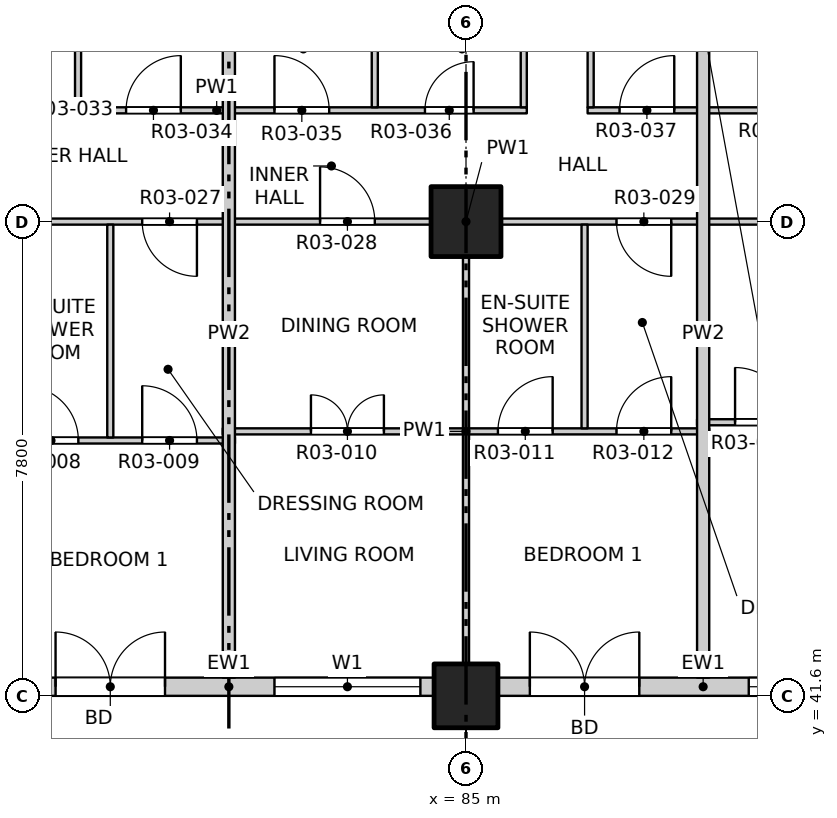
"""IFC4 building model, lengths in metres.
Left out: names, types, materials, properties, quantities, classifications, styles, units other than length and angle.
Written with IfcOpenShell. Run it as: python <this file> out.ifc"""

import sys

from ifc_helpers import new_model, si_unit, direction, frame, frame_2d, origin, origin_2d, place, context, subcontext, project, spatial, rectangle, extrude, element, fill, save


model = new_model("IFC4")
c1 = context("Model", 3, precision=1e-05, world=origin(), true_north=direction((0.0, 1.0)))
c2 = subcontext(c1, "Body", "Model", "MODEL_VIEW")
j1 = project(units=[si_unit("LENGTHUNIT", "METRE"), si_unit("PLANEANGLEUNIT", "RADIAN")], contexts=[c1])
p1 = place(None, origin())
s1 = spatial("IfcSite", under=j1, at=p1, CompositionType="ELEMENT")
p2 = place(p1, origin())
s2 = spatial("IfcBuilding", under=s1, at=p2, CompositionType="ELEMENT")
p3 = place(p2, frame((0.0, 0.0, 39.9)))
s3 = spatial("IfcBuildingStorey", under=s2, at=p3, CompositionType="ELEMENT", Elevation=39.9)
p4 = place(p3, frame((85.0, 41.6, -0.25), z_axis=(0.0, 0.0, 1.0), x_axis=(1.0, 0.0, 0.0)))
e1 = element("IfcColumn", 1, at=p4, inside=s3, PredefinedType="COLUMN", context=c2, shape_type="SweptSolid", body=[
    extrude(rectangle(XDim=1.05, YDim=1.05, at=origin_2d()), origin(), (0.0, 0.0, 1.0), 3.4),
])
p5 = place(p3, frame((85.0, 49.4, -0.25), z_axis=(0.0, 0.0, 1.0), x_axis=(1.0, 0.0, 0.0)))
e2 = element("IfcColumn", 2, at=p5, inside=s3, PredefinedType="COLUMN", context=c2, shape_type="SweptSolid", body=[
    extrude(rectangle(XDim=1.15, YDim=1.15, at=origin_2d()), origin(), (0.0, 0.0, 1.0), 3.4),
])
p6 = place(p3, frame((77.725, 41.75, 0.0), z_axis=(0.0, 0.0, 1.0), x_axis=(1.0, 0.0, 0.0)))
e3 = element("IfcWall", 3, at=p6, inside=s3, PredefinedType="SOLIDWALL", context=c2, shape_type="SweptSolid", body=[
    extrude(rectangle(XDim=6.75, YDim=0.3, at=frame_2d((3.375, 0.0))), origin(), (0.0, 0.0, 1.0), 2.7),
])
p7 = place(p6, frame((0.525, 0.0, 0.0)))
e4 = element("IfcOpeningElement", 4, at=p7, cuts=e3, PredefinedType="OPENING", context=c2, shape_type="SweptSolid", body=[
    extrude(rectangle(XDim=1.8, YDim=2.4, at=frame_2d((0.9, 1.2))), frame((0.0, 0.16, 0.0), z_axis=(0.0, -1.0, 0.0), x_axis=(1.0, 0.0, 0.0)), (0.0, 0.0, 1.0), 0.32),
])
p8 = place(p6, frame((4.125, 0.0, 0.9)))
e5 = element("IfcOpeningElement", 5, at=p8, cuts=e3, PredefinedType="OPENING", context=c2, shape_type="SweptSolid", body=[
    extrude(rectangle(XDim=2.4, YDim=1.8, at=frame_2d((1.2, 0.9))), frame((0.0, 0.16, 0.0), z_axis=(0.0, -1.0, 0.0), x_axis=(1.0, 0.0, 0.0)), (0.0, 0.0, 1.0), 0.32),
])
p9 = place(p3, frame((85.525, 41.75, 0.0), z_axis=(0.0, 0.0, 1.0), x_axis=(1.0, 0.0, 0.0)))
e6 = element("IfcWall", 6, at=p9, inside=s3, PredefinedType="SOLIDWALL", context=c2, shape_type="SweptSolid", body=[
    extrude(rectangle(XDim=6.75, YDim=0.3, at=frame_2d((3.375, 0.0))), origin(), (0.0, 0.0, 1.0), 2.7),
])
p10 = place(p9, frame((0.525, 0.0, 0.0)))
e7 = element("IfcOpeningElement", 7, at=p10, cuts=e6, PredefinedType="OPENING", context=c2, shape_type="SweptSolid", body=[
    extrude(rectangle(XDim=1.8, YDim=2.4, at=frame_2d((0.9, 1.2))), frame((0.0, 0.16, 0.0), z_axis=(0.0, -1.0, 0.0), x_axis=(1.0, 0.0, 0.0)), (0.0, 0.0, 1.0), 0.32),
])
p11 = place(p9, frame((4.125, 0.0, 0.9)))
e8 = element("IfcOpeningElement", 8, at=p11, cuts=e6, PredefinedType="OPENING", context=c2, shape_type="SweptSolid", body=[
    extrude(rectangle(XDim=2.4, YDim=1.8, at=frame_2d((1.2, 0.9))), frame((0.0, 0.16, 0.0), z_axis=(0.0, -1.0, 0.0), x_axis=(1.0, 0.0, 0.0)), (0.0, 0.0, 1.0), 0.32),
])
p12 = place(p3, frame((73.2, 45.8, 0.0), z_axis=(0.0, 0.0, 1.0), x_axis=(1.0, 0.0, 0.0)))
e9 = element("IfcWall", 9, at=p12, inside=s3, PredefinedType="PARTITIONING", context=c2, shape_type="SweptSolid", body=[
    extrude(rectangle(XDim=8.0, YDim=0.1, at=frame_2d((4.0, 0.0))), origin(), (0.0, 0.0, 1.0), 3.15),
])
p13 = place(p12, frame((1.45, 0.0, 0.0)))
e10 = element("IfcOpeningElement", 10, at=p13, cuts=e9, PredefinedType="OPENING", context=c2, shape_type="SweptSolid", body=[
    extrude(rectangle(XDim=1.2, YDim=2.1, at=frame_2d((0.6, 1.05))), frame((0.0, 0.06, 0.0), z_axis=(0.0, -1.0, 0.0), x_axis=(1.0, 0.0, 0.0)), (0.0, 0.0, 1.0), 0.12),
])
p14 = place(p12, frame((4.525, 0.0, 0.0)))
e11 = element("IfcOpeningElement", 11, at=p14, cuts=e9, PredefinedType="OPENING", context=c2, shape_type="SweptSolid", body=[
    extrude(rectangle(XDim=0.9, YDim=2.1, at=frame_2d((0.45, 1.05))), frame((0.0, 0.06, 0.0), z_axis=(0.0, -1.0, 0.0), x_axis=(1.0, 0.0, 0.0)), (0.0, 0.0, 1.0), 0.12),
])
p15 = place(p12, frame((6.475, 0.0, 0.0)))
e12 = element("IfcOpeningElement", 12, at=p15, cuts=e9, PredefinedType="OPENING", context=c2, shape_type="SweptSolid", body=[
    extrude(rectangle(XDim=0.9, YDim=2.1, at=frame_2d((0.45, 1.05))), frame((0.0, 0.06, 0.0), z_axis=(0.0, -1.0, 0.0), x_axis=(1.0, 0.0, 0.0)), (0.0, 0.0, 1.0), 0.12),
])
p16 = place(p3, frame((81.0, 45.95, 0.0), z_axis=(0.0, 0.0, 1.0), x_axis=(1.0, 0.0, 0.0)))
e13 = element("IfcWall", 13, at=p16, inside=s3, PredefinedType="PARTITIONING", context=c2, shape_type="SweptSolid", body=[
    extrude(rectangle(XDim=8.0, YDim=0.1, at=frame_2d((4.0, 0.0))), origin(), (0.0, 0.0, 1.0), 3.15),
])
p17 = place(p16, frame((1.45, 0.0, 0.0)))
e14 = element("IfcOpeningElement", 14, at=p17, cuts=e13, PredefinedType="OPENING", context=c2, shape_type="SweptSolid", body=[
    extrude(rectangle(XDim=1.2, YDim=2.1, at=frame_2d((0.6, 1.05))), frame((0.0, 0.06, 0.0), z_axis=(0.0, -1.0, 0.0), x_axis=(1.0, 0.0, 0.0)), (0.0, 0.0, 1.0), 0.12),
])
p18 = place(p16, frame((4.525, 0.0, 0.0)))
e15 = element("IfcOpeningElement", 15, at=p18, cuts=e13, PredefinedType="OPENING", context=c2, shape_type="SweptSolid", body=[
    extrude(rectangle(XDim=0.9, YDim=2.1, at=frame_2d((0.45, 1.05))), frame((0.0, 0.06, 0.0), z_axis=(0.0, -1.0, 0.0), x_axis=(1.0, 0.0, 0.0)), (0.0, 0.0, 1.0), 0.12),
])
p19 = place(p16, frame((6.475, 0.0, 0.0)))
e16 = element("IfcOpeningElement", 16, at=p19, cuts=e13, PredefinedType="OPENING", context=c2, shape_type="SweptSolid", body=[
    extrude(rectangle(XDim=0.9, YDim=2.1, at=frame_2d((0.45, 1.05))), frame((0.0, 0.06, 0.0), z_axis=(0.0, -1.0, 0.0), x_axis=(1.0, 0.0, 0.0)), (0.0, 0.0, 1.0), 0.12),
])
p20 = place(p3, frame((88.8, 46.1, 0.0), z_axis=(0.0, 0.0, 1.0), x_axis=(1.0, 0.0, 0.0)))
e17 = element("IfcWall", 17, at=p20, inside=s3, PredefinedType="PARTITIONING", context=c2, shape_type="SweptSolid", body=[
    extrude(rectangle(XDim=8.0, YDim=0.1, at=frame_2d((4.0, 0.0))), origin(), (0.0, 0.0, 1.0), 3.15),
])
p21 = place(p20, frame((0.625, 0.0, 0.0)))
e18 = element("IfcOpeningElement", 18, at=p21, cuts=e17, PredefinedType="OPENING", context=c2, shape_type="SweptSolid", body=[
    extrude(rectangle(XDim=0.9, YDim=2.1, at=frame_2d((0.45, 1.05))), frame((0.0, 0.06, 0.0), z_axis=(0.0, -1.0, 0.0), x_axis=(1.0, 0.0, 0.0)), (0.0, 0.0, 1.0), 0.12),
])
p22 = place(p20, frame((2.575, 0.0, 0.0)))
e19 = element("IfcOpeningElement", 19, at=p22, cuts=e17, PredefinedType="OPENING", context=c2, shape_type="SweptSolid", body=[
    extrude(rectangle(XDim=0.9, YDim=2.1, at=frame_2d((0.45, 1.05))), frame((0.0, 0.06, 0.0), z_axis=(0.0, -1.0, 0.0), x_axis=(1.0, 0.0, 0.0)), (0.0, 0.0, 1.0), 0.12),
])
p23 = place(p20, frame((5.35, 0.0, 0.0)))
e20 = element("IfcOpeningElement", 20, at=p23, cuts=e17, PredefinedType="OPENING", context=c2, shape_type="SweptSolid", body=[
    extrude(rectangle(XDim=1.2, YDim=2.1, at=frame_2d((0.6, 1.05))), frame((0.0, 0.06, 0.0), z_axis=(0.0, -1.0, 0.0), x_axis=(1.0, 0.0, 0.0)), (0.0, 0.0, 1.0), 0.12),
])
p24 = place(p3, frame((73.2, 49.4, 0.0), z_axis=(0.0, 0.0, 1.0), x_axis=(1.0, 0.0, 0.0)))
e21 = element("IfcWall", 21, at=p24, inside=s3, PredefinedType="PARTITIONING", context=c2, shape_type="SweptSolid", body=[
    extrude(rectangle(XDim=23.6, YDim=0.1, at=frame_2d((11.8, 0.0))), origin(), (0.0, 0.0, 1.0), 3.15),
])
p25 = place(p24, frame((1.6, 0.0, 0.0)))
e22 = element("IfcOpeningElement", 22, at=p25, cuts=e21, PredefinedType="OPENING", context=c2, shape_type="SweptSolid", body=[
    extrude(rectangle(XDim=0.9, YDim=2.1, at=frame_2d((0.45, 1.05))), frame((0.0, 0.06, 0.0), z_axis=(0.0, -1.0, 0.0), x_axis=(1.0, 0.0, 0.0)), (0.0, 0.0, 1.0), 0.12),
])
p26 = place(p24, frame((6.475, 0.0, 0.0)))
e23 = element("IfcOpeningElement", 23, at=p26, cuts=e21, PredefinedType="OPENING", context=c2, shape_type="SweptSolid", body=[
    extrude(rectangle(XDim=0.9, YDim=2.1, at=frame_2d((0.45, 1.05))), frame((0.0, 0.06, 0.0), z_axis=(0.0, -1.0, 0.0), x_axis=(1.0, 0.0, 0.0)), (0.0, 0.0, 1.0), 0.12),
])
p27 = place(p24, frame((9.4, 0.0, 0.0)))
e24 = element("IfcOpeningElement", 24, at=p27, cuts=e21, PredefinedType="OPENING", context=c2, shape_type="SweptSolid", body=[
    extrude(rectangle(XDim=0.9, YDim=2.1, at=frame_2d((0.45, 1.05))), frame((0.0, 0.06, 0.0), z_axis=(0.0, -1.0, 0.0), x_axis=(1.0, 0.0, 0.0)), (0.0, 0.0, 1.0), 0.12),
])
p28 = place(p24, frame((14.275, 0.0, 0.0)))
e25 = element("IfcOpeningElement", 25, at=p28, cuts=e21, PredefinedType="OPENING", context=c2, shape_type="SweptSolid", body=[
    extrude(rectangle(XDim=0.9, YDim=2.1, at=frame_2d((0.45, 1.05))), frame((0.0, 0.06, 0.0), z_axis=(0.0, -1.0, 0.0), x_axis=(1.0, 0.0, 0.0)), (0.0, 0.0, 1.0), 0.12),
])
p29 = place(p24, frame((18.0, 0.0, 0.0)))
e26 = element("IfcOpeningElement", 26, at=p29, cuts=e21, PredefinedType="OPENING", context=c2, shape_type="SweptSolid", body=[
    extrude(rectangle(XDim=0.9, YDim=2.1, at=frame_2d((0.45, 1.05))), frame((0.0, 0.06, 0.0), z_axis=(0.0, -1.0, 0.0), x_axis=(1.0, 0.0, 0.0)), (0.0, 0.0, 1.0), 0.12),
])
p30 = place(p24, frame((21.1, 0.0, 0.0)))
e27 = element("IfcOpeningElement", 27, at=p30, cuts=e21, PredefinedType="OPENING", context=c2, shape_type="SweptSolid", body=[
    extrude(rectangle(XDim=0.9, YDim=2.1, at=frame_2d((0.45, 1.05))), frame((0.0, 0.06, 0.0), z_axis=(0.0, -1.0, 0.0), x_axis=(1.0, 0.0, 0.0)), (0.0, 0.0, 1.0), 0.12),
])
p31 = place(p3, frame((75.8, 51.23, 0.0), z_axis=(0.0, 0.0, 1.0), x_axis=(1.0, 0.0, 0.0)))
e28 = element("IfcWall", 28, at=p31, inside=s3, PredefinedType="PARTITIONING", context=c2, shape_type="SweptSolid", body=[
    extrude(rectangle(XDim=10.2, YDim=0.1, at=frame_2d((5.1, 0.0))), origin(), (0.0, 0.0, 1.0), 3.15),
])
p32 = place(p31, frame((0.985, 0.0, 0.0)))
e29 = element("IfcOpeningElement", 29, at=p32, cuts=e28, PredefinedType="OPENING", context=c2, shape_type="SweptSolid", body=[
    extrude(rectangle(XDim=0.9, YDim=2.1, at=frame_2d((0.45, 1.05))), frame((0.0, 0.06, 0.0), z_axis=(0.0, -1.0, 0.0), x_axis=(1.0, 0.0, 0.0)), (0.0, 0.0, 1.0), 0.12),
])
p33 = place(p31, frame((3.61, 0.0, 0.0)))
e30 = element("IfcOpeningElement", 30, at=p33, cuts=e28, PredefinedType="OPENING", context=c2, shape_type="SweptSolid", body=[
    extrude(rectangle(XDim=0.9, YDim=2.1, at=frame_2d((0.45, 1.05))), frame((0.0, 0.06, 0.0), z_axis=(0.0, -1.0, 0.0), x_axis=(1.0, 0.0, 0.0)), (0.0, 0.0, 1.0), 0.12),
])
p34 = place(p31, frame((6.05, 0.0, 0.0)))
e31 = element("IfcOpeningElement", 31, at=p34, cuts=e28, PredefinedType="OPENING", context=c2, shape_type="SweptSolid", body=[
    extrude(rectangle(XDim=0.9, YDim=2.1, at=frame_2d((0.45, 1.05))), frame((0.0, 0.06, 0.0), z_axis=(0.0, -1.0, 0.0), x_axis=(1.0, 0.0, 0.0)), (0.0, 0.0, 1.0), 0.12),
])
p35 = place(p31, frame((8.525, 0.0, 0.0)))
e32 = element("IfcOpeningElement", 32, at=p35, cuts=e28, PredefinedType="OPENING", context=c2, shape_type="SweptSolid", body=[
    extrude(rectangle(XDim=0.8, YDim=2.1, at=frame_2d((0.4, 1.05))), frame((0.0, 0.06, 0.0), z_axis=(0.0, -1.0, 0.0), x_axis=(1.0, 0.0, 0.0)), (0.0, 0.0, 1.0), 0.12),
])
p36 = place(p3, frame((87.0, 51.23, 0.0), z_axis=(0.0, 0.0, 1.0), x_axis=(1.0, 0.0, 0.0)))
e33 = element("IfcWall", 33, at=p36, inside=s3, PredefinedType="PARTITIONING", context=c2, shape_type="SweptSolid", body=[
    extrude(rectangle(XDim=6.95, YDim=0.1, at=frame_2d((3.475, 0.0))), origin(), (0.0, 0.0, 1.0), 3.15),
])
p37 = place(p36, frame((0.525, 0.0, 0.0)))
e34 = element("IfcOpeningElement", 34, at=p37, cuts=e33, PredefinedType="OPENING", context=c2, shape_type="SweptSolid", body=[
    extrude(rectangle(XDim=0.9, YDim=2.1, at=frame_2d((0.45, 1.05))), frame((0.0, 0.06, 0.0), z_axis=(0.0, -1.0, 0.0), x_axis=(1.0, 0.0, 0.0)), (0.0, 0.0, 1.0), 0.12),
])
p38 = place(p36, frame((2.875, 0.0, 0.0)))
e35 = element("IfcOpeningElement", 35, at=p38, cuts=e33, PredefinedType="OPENING", context=c2, shape_type="SweptSolid", body=[
    extrude(rectangle(XDim=0.9, YDim=2.1, at=frame_2d((0.45, 1.05))), frame((0.0, 0.06, 0.0), z_axis=(0.0, -1.0, 0.0), x_axis=(1.0, 0.0, 0.0)), (0.0, 0.0, 1.0), 0.12),
])
p39 = place(p36, frame((5.425, 0.0, 0.0)))
e36 = element("IfcOpeningElement", 36, at=p39, cuts=e33, PredefinedType="OPENING", context=c2, shape_type="SweptSolid", body=[
    extrude(rectangle(XDim=0.8, YDim=2.1, at=frame_2d((0.4, 1.05))), frame((0.0, 0.06, 0.0), z_axis=(0.0, -1.0, 0.0), x_axis=(1.0, 0.0, 0.0)), (0.0, 0.0, 1.0), 0.12),
])
p40 = place(p3, frame((78.62, 51.28, 0.0), z_axis=(0.0, 0.0, 1.0), x_axis=(0.0, 1.0, 0.0)))
e37 = element("IfcWall", 37, at=p40, inside=s3, PredefinedType="PARTITIONING", context=c2, shape_type="SweptSolid", body=[
    extrude(rectangle(XDim=1.92, YDim=0.1, at=frame_2d((0.96, 0.0))), origin(), (0.0, 0.0, 1.0), 3.15),
])
p41 = place(p3, frame((79.15, 45.85, 0.0), z_axis=(0.0, 0.0, 1.0), x_axis=(0.0, 1.0, 0.0)))
e38 = element("IfcWall", 38, at=p41, inside=s3, PredefinedType="PARTITIONING", context=c2, shape_type="SweptSolid", body=[
    extrude(rectangle(XDim=3.5, YDim=0.1, at=frame_2d((1.75, 0.0))), origin(), (0.0, 0.0, 1.0), 3.15),
])
p42 = place(p3, frame((81.1, 41.9, 0.0), z_axis=(0.0, 0.0, 1.0), x_axis=(0.0, 1.0, 0.0)))
e39 = element("IfcWall", 39, at=p42, inside=s3, PredefinedType="PARTITIONING", context=c2, shape_type="SweptSolid", body=[
    extrude(rectangle(XDim=11.3, YDim=0.2, at=frame_2d((5.65, 0.0))), origin(), (0.0, 0.0, 1.0), 3.15),
])
p43 = place(p3, frame((83.5, 51.28, 0.0), z_axis=(0.0, 0.0, 1.0), x_axis=(0.0, 1.0, 0.0)))
e40 = element("IfcWall", 40, at=p43, inside=s3, PredefinedType="PARTITIONING", context=c2, shape_type="SweptSolid", body=[
    extrude(rectangle(XDim=1.92, YDim=0.1, at=frame_2d((0.96, 0.0))), origin(), (0.0, 0.0, 1.0), 3.15),
])
p44 = place(p3, frame((85.0, 41.9, 0.0), z_axis=(0.0, 0.0, 1.0), x_axis=(0.0, 1.0, 0.0)))
e41 = element("IfcWall", 41, at=p44, inside=s3, PredefinedType="PARTITIONING", context=c2, shape_type="SweptSolid", body=[
    extrude(rectangle(XDim=7.45, YDim=0.1, at=frame_2d((3.725, 0.0))), origin(), (0.0, 0.0, 1.0), 2.55),
])
p45 = place(p3, frame((85.95, 51.28, 0.0), z_axis=(0.0, 0.0, 1.0), x_axis=(0.0, 1.0, 0.0)))
e42 = element("IfcWall", 42, at=p45, inside=s3, PredefinedType="PARTITIONING", context=c2, shape_type="SweptSolid", body=[
    extrude(rectangle(XDim=1.92, YDim=0.1, at=frame_2d((0.96, 0.0))), origin(), (0.0, 0.0, 1.0), 3.15),
])
p46 = place(p3, frame((86.95, 46.0, 0.0), z_axis=(0.0, 0.0, 1.0), x_axis=(0.0, 1.0, 0.0)))
e43 = element("IfcWall", 43, at=p46, inside=s3, PredefinedType="PARTITIONING", context=c2, shape_type="SweptSolid", body=[
    extrude(rectangle(XDim=3.35, YDim=0.1, at=frame_2d((1.675, 0.0))), origin(), (0.0, 0.0, 1.0), 3.15),
])
p47 = place(p3, frame((87.05, 51.28, 0.0), z_axis=(0.0, 0.0, 1.0), x_axis=(0.0, 1.0, 0.0)))
e44 = element("IfcWall", 44, at=p47, inside=s3, PredefinedType="PARTITIONING", context=c2, shape_type="SweptSolid", body=[
    extrude(rectangle(XDim=1.92, YDim=0.1, at=frame_2d((0.96, 0.0))), origin(), (0.0, 0.0, 1.0), 3.15),
])
p48 = place(p3, frame((88.9, 41.9, 0.0), z_axis=(0.0, 0.0, 1.0), x_axis=(0.0, 1.0, 0.0)))
e45 = element("IfcWall", 45, at=p48, inside=s3, PredefinedType="PARTITIONING", context=c2, shape_type="SweptSolid", body=[
    extrude(rectangle(XDim=11.3, YDim=0.2, at=frame_2d((5.65, 0.0))), origin(), (0.0, 0.0, 1.0), 3.15),
])
p49 = place(p7, origin())
e46 = element("IfcDoor", 46, at=p49, inside=s3, OperationType="DOUBLE_DOOR_SINGLE_SWING", PredefinedType="DOOR", context=c2, shape_type="SweptSolid", body=[
    extrude(rectangle(XDim=1.8, YDim=2.4, at=frame_2d((0.9, 1.2))), frame((0.0, 0.025, 0.0), z_axis=(0.0, -1.0, 0.0), x_axis=(1.0, 0.0, 0.0)), (0.0, 0.0, 1.0), 0.05),
])
fill(e4, e46)
p50 = place(p8, origin())
e47 = element("IfcWindow", 47, at=p50, inside=s3, PartitioningType="DOUBLE_PANEL_VERTICAL", PredefinedType="WINDOW", context=c2, shape_type="SweptSolid", body=[
    extrude(rectangle(XDim=2.4, YDim=1.8, at=frame_2d((1.2, 0.9))), frame((0.0, 0.03, 0.0), z_axis=(0.0, -1.0, 0.0), x_axis=(1.0, 0.0, 0.0)), (0.0, 0.0, 1.0), 0.06),
])
fill(e5, e47)
p51 = place(p10, origin())
e48 = element("IfcDoor", 48, at=p51, inside=s3, OperationType="DOUBLE_DOOR_SINGLE_SWING", PredefinedType="DOOR", context=c2, shape_type="SweptSolid", body=[
    extrude(rectangle(XDim=1.8, YDim=2.4, at=frame_2d((0.9, 1.2))), frame((0.0, 0.025, 0.0), z_axis=(0.0, -1.0, 0.0), x_axis=(1.0, 0.0, 0.0)), (0.0, 0.0, 1.0), 0.05),
])
fill(e7, e48)
p52 = place(p11, origin())
e49 = element("IfcWindow", 49, at=p52, inside=s3, PartitioningType="DOUBLE_PANEL_VERTICAL", PredefinedType="WINDOW", context=c2, shape_type="SweptSolid", body=[
    extrude(rectangle(XDim=2.4, YDim=1.8, at=frame_2d((1.2, 0.9))), frame((0.0, 0.03, 0.0), z_axis=(0.0, -1.0, 0.0), x_axis=(1.0, 0.0, 0.0)), (0.0, 0.0, 1.0), 0.06),
])
fill(e8, e49)
p53 = place(p14, origin())
e50 = element("IfcDoor", 50, at=p53, inside=s3, OperationType="SINGLE_SWING_LEFT", PredefinedType="DOOR", context=c2, shape_type="SweptSolid", body=[
    extrude(rectangle(XDim=0.9, YDim=2.1, at=frame_2d((0.45, 1.05))), frame((0.0, 0.025, 0.0), z_axis=(0.0, -1.0, 0.0), x_axis=(1.0, 0.0, 0.0)), (0.0, 0.0, 1.0), 0.05),
])
fill(e11, e50)
p54 = place(p15, origin())
e51 = element("IfcDoor", 51, at=p54, inside=s3, OperationType="SINGLE_SWING_LEFT", PredefinedType="DOOR", context=c2, shape_type="SweptSolid", body=[
    extrude(rectangle(XDim=0.9, YDim=2.1, at=frame_2d((0.45, 1.05))), frame((0.0, 0.025, 0.0), z_axis=(0.0, -1.0, 0.0), x_axis=(1.0, 0.0, 0.0)), (0.0, 0.0, 1.0), 0.05),
])
fill(e12, e51)
p55 = place(p17, origin())
e52 = element("IfcDoor", 52, at=p55, inside=s3, OperationType="DOUBLE_DOOR_SINGLE_SWING", PredefinedType="DOOR", context=c2, shape_type="SweptSolid", body=[
    extrude(rectangle(XDim=1.2, YDim=2.1, at=frame_2d((0.6, 1.05))), frame((0.0, 0.025, 0.0), z_axis=(0.0, -1.0, 0.0), x_axis=(1.0, 0.0, 0.0)), (0.0, 0.0, 1.0), 0.05),
])
fill(e14, e52)
p56 = place(p18, origin())
e53 = element("IfcDoor", 53, at=p56, inside=s3, OperationType="SINGLE_SWING_RIGHT", PredefinedType="DOOR", context=c2, shape_type="SweptSolid", body=[
    extrude(rectangle(XDim=0.9, YDim=2.1, at=frame_2d((0.45, 1.05))), frame((0.0, 0.025, 0.0), z_axis=(0.0, -1.0, 0.0), x_axis=(1.0, 0.0, 0.0)), (0.0, 0.0, 1.0), 0.05),
])
fill(e15, e53)
p57 = place(p19, origin())
e54 = element("IfcDoor", 54, at=p57, inside=s3, OperationType="SINGLE_SWING_RIGHT", PredefinedType="DOOR", context=c2, shape_type="SweptSolid", body=[
    extrude(rectangle(XDim=0.9, YDim=2.1, at=frame_2d((0.45, 1.05))), frame((0.0, 0.025, 0.0), z_axis=(0.0, -1.0, 0.0), x_axis=(1.0, 0.0, 0.0)), (0.0, 0.0, 1.0), 0.05),
])
fill(e16, e54)
p58 = place(p21, origin())
e55 = element("IfcDoor", 55, at=p58, inside=s3, OperationType="SINGLE_SWING_LEFT", PredefinedType="DOOR", context=c2, shape_type="SweptSolid", body=[
    extrude(rectangle(XDim=0.9, YDim=2.1, at=frame_2d((0.45, 1.05))), frame((0.0, 0.025, 0.0), z_axis=(0.0, -1.0, 0.0), x_axis=(1.0, 0.0, 0.0)), (0.0, 0.0, 1.0), 0.05),
])
fill(e18, e55)
p59 = place(p26, origin())
e56 = element("IfcDoor", 56, at=p59, inside=s3, OperationType="SINGLE_SWING_LEFT", PredefinedType="DOOR", context=c2, shape_type="SweptSolid", body=[
    extrude(rectangle(XDim=0.9, YDim=2.1, at=frame_2d((0.45, 1.05))), frame((0.0, 0.025, 0.0), z_axis=(0.0, -1.0, 0.0), x_axis=(1.0, 0.0, 0.0)), (0.0, 0.0, 1.0), 0.05),
])
fill(e23, e56)
p60 = place(p27, origin())
e57 = element("IfcDoor", 57, at=p60, inside=s3, OperationType="SINGLE_SWING_LEFT", PredefinedType="DOOR", context=c2, shape_type="SweptSolid", body=[
    extrude(rectangle(XDim=0.9, YDim=2.1, at=frame_2d((0.45, 1.05))), frame((0.0, 0.025, 0.0), z_axis=(0.0, -1.0, 0.0), x_axis=(1.0, 0.0, 0.0)), (0.0, 0.0, 1.0), 0.05),
])
fill(e24, e57)
p61 = place(p28, origin())
e58 = element("IfcDoor", 58, at=p61, inside=s3, OperationType="SINGLE_SWING_LEFT", PredefinedType="DOOR", context=c2, shape_type="SweptSolid", body=[
    extrude(rectangle(XDim=0.9, YDim=2.1, at=frame_2d((0.45, 1.05))), frame((0.0, 0.025, 0.0), z_axis=(0.0, -1.0, 0.0), x_axis=(1.0, 0.0, 0.0)), (0.0, 0.0, 1.0), 0.05),
])
fill(e25, e58)
p62 = place(p33, origin())
e59 = element("IfcDoor", 59, at=p62, inside=s3, OperationType="SINGLE_SWING_RIGHT", PredefinedType="DOOR", context=c2, shape_type="SweptSolid", body=[
    extrude(rectangle(XDim=0.9, YDim=2.1, at=frame_2d((0.45, 1.05))), frame((0.0, 0.025, 0.0), z_axis=(0.0, -1.0, 0.0), x_axis=(1.0, 0.0, 0.0)), (0.0, 0.0, 1.0), 0.05),
])
fill(e30, e59)
p63 = place(p34, origin())
e60 = element("IfcDoor", 60, at=p63, inside=s3, OperationType="SINGLE_SWING_LEFT", PredefinedType="DOOR", context=c2, shape_type="SweptSolid", body=[
    extrude(rectangle(XDim=0.9, YDim=2.1, at=frame_2d((0.45, 1.05))), frame((0.0, 0.025, 0.0), z_axis=(0.0, -1.0, 0.0), x_axis=(1.0, 0.0, 0.0)), (0.0, 0.0, 1.0), 0.05),
])
fill(e31, e60)
p64 = place(p35, origin())
e61 = element("IfcDoor", 61, at=p64, inside=s3, OperationType="SINGLE_SWING_RIGHT", PredefinedType="DOOR", context=c2, shape_type="SweptSolid", body=[
    extrude(rectangle(XDim=0.8, YDim=2.1, at=frame_2d((0.4, 1.05))), frame((0.0, 0.025, 0.0), z_axis=(0.0, -1.0, 0.0), x_axis=(1.0, 0.0, 0.0)), (0.0, 0.0, 1.0), 0.05),
])
fill(e32, e61)
p65 = place(p37, origin())
e62 = element("IfcDoor", 62, at=p65, inside=s3, OperationType="SINGLE_SWING_RIGHT", PredefinedType="DOOR", context=c2, shape_type="SweptSolid", body=[
    extrude(rectangle(XDim=0.9, YDim=2.1, at=frame_2d((0.45, 1.05))), frame((0.0, 0.025, 0.0), z_axis=(0.0, -1.0, 0.0), x_axis=(1.0, 0.0, 0.0)), (0.0, 0.0, 1.0), 0.05),
])
fill(e34, e62)
save(model, sys.argv[1])
